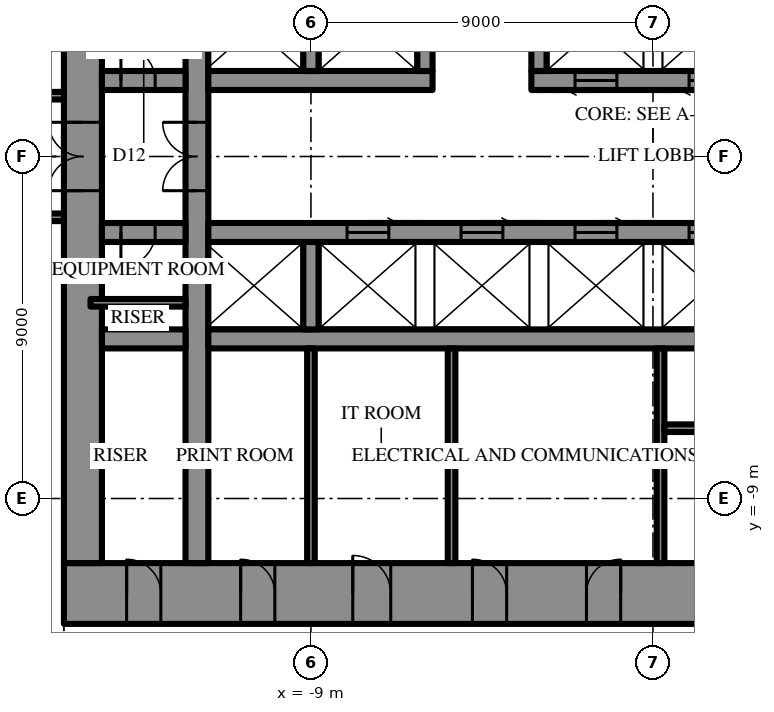
"""IFC4 building model, lengths in metres.
Left out: names, types, materials, properties, quantities, classifications, styles, units other than length and angle.
Written with IfcOpenShell. Run it as: python <this file> out.ifc"""

import sys

from ifc_helpers import new_model, si_unit, direction, frame, frame_2d, origin, place, context, subcontext, project, spatial, rectangle, extrude, element, fill, save


model = new_model("IFC4")
c1 = context("Model", 3, precision=1e-05, world=origin(), true_north=direction((0.0, 1.0)))
c2 = subcontext(c1, "Body", "Model", "MODEL_VIEW")
j1 = project(units=[si_unit("LENGTHUNIT", "METRE"), si_unit("PLANEANGLEUNIT", "RADIAN")], contexts=[c1])
p1 = place(None, origin())
s1 = spatial("IfcSite", under=j1, at=p1, CompositionType="ELEMENT")
p2 = place(p1, origin())
s2 = spatial("IfcBuilding", under=s1, at=p2, CompositionType="ELEMENT")
p3 = place(p2, frame((0.0, 0.0, 236.5)))
s3 = spatial("IfcBuildingStorey", under=s2, at=p3, CompositionType="ELEMENT", Elevation=236.5)
p4 = place(p3, frame((15.5, -11.5, 0.0), z_axis=(0.0, 0.0, 1.0), x_axis=(-1.0, 0.0, 0.0)))
e1 = element("IfcWall", 1, at=p4, inside=s3, PredefinedType="SHEAR", context=c2, shape_type="SweptSolid", body=[
    extrude(rectangle(XDim=31.0, YDim=1.6, at=frame_2d((15.5, 0.0))), origin(), (0.0, 0.0, 1.0), 4.2),
])
p5 = place(p4, frame((16.35, 0.0, 0.0)))
e2 = element("IfcOpeningElement", 2, at=p5, cuts=e1, PredefinedType="OPENING", context=c2, shape_type="SweptSolid", body=[
    extrude(rectangle(XDim=0.9, YDim=2.2, at=frame_2d((0.45, 1.1))), frame((0.0, 0.81, 0.0), z_axis=(0.0, -1.0, 0.0), x_axis=(1.0, 0.0, 0.0)), (0.0, 0.0, 1.0), 1.62),
])
p6 = place(p4, frame((19.35, 0.0, 0.0)))
e3 = element("IfcOpeningElement", 3, at=p6, cuts=e1, PredefinedType="OPENING", context=c2, shape_type="SweptSolid", body=[
    extrude(rectangle(XDim=0.9, YDim=2.2, at=frame_2d((0.45, 1.1))), frame((0.0, 0.81, 0.0), z_axis=(0.0, -1.0, 0.0), x_axis=(1.0, 0.0, 0.0)), (0.0, 0.0, 1.0), 1.62),
])
p7 = place(p4, frame((22.4, 0.0, 0.0)))
e4 = element("IfcOpeningElement", 4, at=p7, cuts=e1, PredefinedType="OPENING", context=c2, shape_type="SweptSolid", body=[
    extrude(rectangle(XDim=1.0, YDim=2.2, at=frame_2d((0.5, 1.1))), frame((0.0, 0.81, 0.0), z_axis=(0.0, -1.0, 0.0), x_axis=(1.0, 0.0, 0.0)), (0.0, 0.0, 1.0), 1.62),
])
p8 = place(p4, frame((1.65, 0.0, 0.0)))
e5 = element("IfcOpeningElement", 5, at=p8, cuts=e1, PredefinedType="OPENING", context=c2, shape_type="SweptSolid", body=[
    extrude(rectangle(XDim=0.9, YDim=2.2, at=frame_2d((0.45, 1.1))), frame((0.0, 0.81, 0.0), z_axis=(0.0, -1.0, 0.0), x_axis=(1.0, 0.0, 0.0)), (0.0, 0.0, 1.0), 1.62),
])
p9 = place(p4, frame((4.65, 0.0, 0.0)))
e6 = element("IfcOpeningElement", 6, at=p9, cuts=e1, PredefinedType="OPENING", context=c2, shape_type="SweptSolid", body=[
    extrude(rectangle(XDim=0.9, YDim=2.2, at=frame_2d((0.45, 1.1))), frame((0.0, 0.81, 0.0), z_axis=(0.0, -1.0, 0.0), x_axis=(1.0, 0.0, 0.0)), (0.0, 0.0, 1.0), 1.62),
])
p10 = place(p4, frame((25.45, 0.0, 0.0)))
e7 = element("IfcOpeningElement", 7, at=p10, cuts=e1, PredefinedType="OPENING", context=c2, shape_type="SweptSolid", body=[
    extrude(rectangle(XDim=0.9, YDim=2.2, at=frame_2d((0.45, 1.1))), frame((0.0, 0.81, 0.0), z_axis=(0.0, -1.0, 0.0), x_axis=(1.0, 0.0, 0.0)), (0.0, 0.0, 1.0), 1.62),
])
p11 = place(p4, frame((28.45, 0.0, 0.0)))
e8 = element("IfcOpeningElement", 8, at=p11, cuts=e1, PredefinedType="OPENING", context=c2, shape_type="SweptSolid", body=[
    extrude(rectangle(XDim=0.9, YDim=2.2, at=frame_2d((0.45, 1.1))), frame((0.0, 0.81, 0.0), z_axis=(0.0, -1.0, 0.0), x_axis=(1.0, 0.0, 0.0)), (0.0, 0.0, 1.0), 1.62),
])
p12 = place(p3, frame((-15.0, 10.7, 0.0), z_axis=(0.0, 0.0, 1.0), x_axis=(0.0, -1.0, 0.0)))
e9 = element("IfcWall", 9, at=p12, inside=s3, PredefinedType="SHEAR", context=c2, shape_type="SweptSolid", body=[
    extrude(rectangle(XDim=21.4, YDim=1.0, at=frame_2d((10.7, 0.0))), origin(), (0.0, 0.0, 1.0), 4.2),
])
p13 = place(p12, frame((9.8, 0.0, 0.0)))
e10 = element("IfcOpeningElement", 10, at=p13, cuts=e9, PredefinedType="OPENING", context=c2, shape_type="SweptSolid", body=[
    extrude(rectangle(XDim=1.8, YDim=2.4, at=frame_2d((0.9, 1.2))), frame((0.0, 0.51, 0.0), z_axis=(0.0, -1.0, 0.0), x_axis=(1.0, 0.0, 0.0)), (0.0, 0.0, 1.0), 1.02),
])
p14 = place(p3, frame((-12.0, -10.7, 0.0), z_axis=(0.0, 0.0, 1.0), x_axis=(0.0, 1.0, 0.0)))
e11 = element("IfcWall", 11, at=p14, inside=s3, PredefinedType="SHEAR", context=c2, shape_type="SweptSolid", body=[
    extrude(rectangle(XDim=21.4, YDim=0.6, at=frame_2d((10.7, 0.0))), origin(), (0.0, 0.0, 1.0), 4.2),
])
p15 = place(p14, frame((9.8, 0.0, 0.0)))
e12 = element("IfcOpeningElement", 12, at=p15, cuts=e11, PredefinedType="OPENING", context=c2, shape_type="SweptSolid", body=[
    extrude(rectangle(XDim=1.8, YDim=2.4, at=frame_2d((0.9, 1.2))), frame((0.0, 0.31, 0.0), z_axis=(0.0, -1.0, 0.0), x_axis=(1.0, 0.0, 0.0)), (0.0, 0.0, 1.0), 0.62),
])
p16 = place(p3, frame((-14.5, 2.0, 0.0), z_axis=(0.0, 0.0, 1.0), x_axis=(1.0, 0.0, 0.0)))
e13 = element("IfcWall", 13, at=p16, inside=s3, PredefinedType="SHEAR", context=c2, shape_type="SweptSolid", body=[
    extrude(rectangle(XDim=2.2, YDim=0.5, at=frame_2d((1.1, 0.0))), origin(), (0.0, 0.0, 1.0), 4.2),
])
p17 = place(p16, frame((0.5, 0.0, 0.0)))
e14 = element("IfcOpeningElement", 14, at=p17, cuts=e13, PredefinedType="OPENING", context=c2, shape_type="SweptSolid", body=[
    extrude(rectangle(XDim=0.9, YDim=2.2, at=frame_2d((0.45, 1.1))), frame((0.0, 0.26, 0.0), z_axis=(0.0, -1.0, 0.0), x_axis=(1.0, 0.0, 0.0)), (0.0, 0.0, 1.0), 0.52),
])
p18 = place(p3, frame((-11.7, 2.0, 0.0), z_axis=(0.0, 0.0, 1.0), x_axis=(1.0, 0.0, 0.0)))
e15 = element("IfcWall", 15, at=p18, inside=s3, PredefinedType="SHEAR", context=c2, shape_type="SweptSolid", body=[
    extrude(rectangle(XDim=5.9, YDim=0.5, at=frame_2d((2.95, 0.0))), origin(), (0.0, 0.0, 1.0), 4.2),
])
p19 = place(p3, frame((-3.2, 2.0, 0.0), z_axis=(0.0, 0.0, 1.0), x_axis=(1.0, 0.0, 0.0)))
e16 = element("IfcWall", 16, at=p19, inside=s3, PredefinedType="SHEAR", context=c2, shape_type="SweptSolid", body=[
    extrude(rectangle(XDim=14.9, YDim=0.5, at=frame_2d((7.45, 0.0))), origin(), (0.0, 0.0, 1.0), 4.2),
])
p20 = place(p19, frame((1.15, 0.0, 0.0)))
e17 = element("IfcOpeningElement", 17, at=p20, cuts=e16, PredefinedType="OPENING", context=c2, shape_type="SweptSolid", body=[
    extrude(rectangle(XDim=1.1, YDim=2.2, at=frame_2d((0.55, 1.1))), frame((0.0, 0.26, 0.0), z_axis=(0.0, -1.0, 0.0), x_axis=(1.0, 0.0, 0.0)), (0.0, 0.0, 1.0), 0.52),
])
p21 = place(p19, frame((4.15, 0.0, 0.0)))
e18 = element("IfcOpeningElement", 18, at=p21, cuts=e16, PredefinedType="OPENING", context=c2, shape_type="SweptSolid", body=[
    extrude(rectangle(XDim=1.1, YDim=2.2, at=frame_2d((0.55, 1.1))), frame((0.0, 0.26, 0.0), z_axis=(0.0, -1.0, 0.0), x_axis=(1.0, 0.0, 0.0)), (0.0, 0.0, 1.0), 0.52),
])
p22 = place(p19, frame((7.15, 0.0, 0.0)))
e19 = element("IfcOpeningElement", 19, at=p22, cuts=e16, PredefinedType="OPENING", context=c2, shape_type="SweptSolid", body=[
    extrude(rectangle(XDim=1.1, YDim=2.2, at=frame_2d((0.55, 1.1))), frame((0.0, 0.26, 0.0), z_axis=(0.0, -1.0, 0.0), x_axis=(1.0, 0.0, 0.0)), (0.0, 0.0, 1.0), 0.52),
])
p23 = place(p19, frame((10.15, 0.0, 0.0)))
e20 = element("IfcOpeningElement", 20, at=p23, cuts=e16, PredefinedType="OPENING", context=c2, shape_type="SweptSolid", body=[
    extrude(rectangle(XDim=1.1, YDim=2.2, at=frame_2d((0.55, 1.1))), frame((0.0, 0.26, 0.0), z_axis=(0.0, -1.0, 0.0), x_axis=(1.0, 0.0, 0.0)), (0.0, 0.0, 1.0), 0.52),
])
for number, where, z_axis, x_axis in (
    (21, (-9.0, 2.25, 0.0), (0.0, 0.0, 1.0), (0.0, 1.0, 0.0)),
    (22, (-6.0, 2.25, 0.0), (0.0, 0.0, 1.0), (0.0, 1.0, 0.0)),
    (23, (-3.0, 2.25, 0.0), (0.0, 0.0, 1.0), (0.0, 1.0, 0.0)),
):
    element("IfcWall", number, at=place(p3, frame(where, z_axis=z_axis, x_axis=x_axis)), inside=s3, PredefinedType="SHEAR", context=c2, shape_type="SweptSolid", body=[
        extrude(rectangle(XDim=2.3, YDim=0.4, at=frame_2d((1.15, 0.0))), origin(), (0.0, 0.0, 1.0), 4.2),
    ])
p24 = place(p3, frame((3.2, -2.0, 0.0), z_axis=(0.0, 0.0, 1.0), x_axis=(-1.0, 0.0, 0.0)))
e24 = element("IfcWall", 24, at=p24, inside=s3, PredefinedType="SHEAR", context=c2, shape_type="SweptSolid", body=[
    extrude(rectangle(XDim=14.9, YDim=0.5, at=frame_2d((7.45, 0.0))), origin(), (0.0, 0.0, 1.0), 4.2),
])
p25 = place(p24, frame((1.15, 0.0, 0.0)))
e25 = element("IfcOpeningElement", 25, at=p25, cuts=e24, PredefinedType="OPENING", context=c2, shape_type="SweptSolid", body=[
    extrude(rectangle(XDim=1.1, YDim=2.2, at=frame_2d((0.55, 1.1))), frame((0.0, 0.26, 0.0), z_axis=(0.0, -1.0, 0.0), x_axis=(1.0, 0.0, 0.0)), (0.0, 0.0, 1.0), 0.52),
])
p26 = place(p24, frame((4.15, 0.0, 0.0)))
e26 = element("IfcOpeningElement", 26, at=p26, cuts=e24, PredefinedType="OPENING", context=c2, shape_type="SweptSolid", body=[
    extrude(rectangle(XDim=1.1, YDim=2.2, at=frame_2d((0.55, 1.1))), frame((0.0, 0.26, 0.0), z_axis=(0.0, -1.0, 0.0), x_axis=(1.0, 0.0, 0.0)), (0.0, 0.0, 1.0), 0.52),
])
p27 = place(p24, frame((7.15, 0.0, 0.0)))
e27 = element("IfcOpeningElement", 27, at=p27, cuts=e24, PredefinedType="OPENING", context=c2, shape_type="SweptSolid", body=[
    extrude(rectangle(XDim=1.1, YDim=2.2, at=frame_2d((0.55, 1.1))), frame((0.0, 0.26, 0.0), z_axis=(0.0, -1.0, 0.0), x_axis=(1.0, 0.0, 0.0)), (0.0, 0.0, 1.0), 0.52),
])
p28 = place(p24, frame((10.15, 0.0, 0.0)))
e28 = element("IfcOpeningElement", 28, at=p28, cuts=e24, PredefinedType="OPENING", context=c2, shape_type="SweptSolid", body=[
    extrude(rectangle(XDim=1.1, YDim=2.2, at=frame_2d((0.55, 1.1))), frame((0.0, 0.26, 0.0), z_axis=(0.0, -1.0, 0.0), x_axis=(1.0, 0.0, 0.0)), (0.0, 0.0, 1.0), 0.52),
])
p29 = place(p3, frame((-12.3, -2.0, 0.0), z_axis=(0.0, 0.0, 1.0), x_axis=(-1.0, 0.0, 0.0)))
e29 = element("IfcWall", 29, at=p29, inside=s3, PredefinedType="SHEAR", context=c2, shape_type="SweptSolid", body=[
    extrude(rectangle(XDim=2.2, YDim=0.5, at=frame_2d((1.1, 0.0))), origin(), (0.0, 0.0, 1.0), 4.2),
])
p30 = place(p29, frame((0.8, 0.0, 0.0)))
e30 = element("IfcOpeningElement", 30, at=p30, cuts=e29, PredefinedType="OPENING", context=c2, shape_type="SweptSolid", body=[
    extrude(rectangle(XDim=0.9, YDim=2.2, at=frame_2d((0.45, 1.1))), frame((0.0, 0.26, 0.0), z_axis=(0.0, -1.0, 0.0), x_axis=(1.0, 0.0, 0.0)), (0.0, 0.0, 1.0), 0.52),
])
p31 = place(p3, frame((11.7, -4.8, 0.0), z_axis=(0.0, 0.0, 1.0), x_axis=(-1.0, 0.0, 0.0)))
e31 = element("IfcWall", 31, at=p31, inside=s3, PredefinedType="SHEAR", context=c2, shape_type="SweptSolid", body=[
    extrude(rectangle(XDim=23.4, YDim=0.5, at=frame_2d((11.7, 0.0))), origin(), (0.0, 0.0, 1.0), 4.2),
])
p32 = place(p31, frame((6.6, 0.0, 0.0)))
e32 = element("IfcOpeningElement", 32, at=p32, cuts=e31, PredefinedType="OPENING", context=c2, shape_type="SweptSolid", body=[
    extrude(rectangle(XDim=1.2, YDim=2.2, at=frame_2d((0.6, 1.1))), frame((0.0, 0.26, 0.0), z_axis=(0.0, -1.0, 0.0), x_axis=(1.0, 0.0, 0.0)), (0.0, 0.0, 1.0), 0.52),
])
p33 = place(p31, frame((3.6, 0.0, 0.0)))
e33 = element("IfcOpeningElement", 33, at=p33, cuts=e31, PredefinedType="OPENING", context=c2, shape_type="SweptSolid", body=[
    extrude(rectangle(XDim=1.2, YDim=2.2, at=frame_2d((0.6, 1.1))), frame((0.0, 0.26, 0.0), z_axis=(0.0, -1.0, 0.0), x_axis=(1.0, 0.0, 0.0)), (0.0, 0.0, 1.0), 0.52),
])
p34 = place(p3, frame((-12.3, -4.8, 0.0), z_axis=(0.0, 0.0, 1.0), x_axis=(-1.0, 0.0, 0.0)))
e34 = element("IfcWall", 34, at=p34, inside=s3, PredefinedType="SHEAR", context=c2, shape_type="SweptSolid", body=[
    extrude(rectangle(XDim=2.2, YDim=0.5, at=frame_2d((1.1, 0.0))), origin(), (0.0, 0.0, 1.0), 4.2),
])
p35 = place(p3, frame((-9.0, -2.25, 0.0), z_axis=(0.0, 0.0, 1.0), x_axis=(0.0, -1.0, 0.0)))
e35 = element("IfcWall", 35, at=p35, inside=s3, PredefinedType="SHEAR", context=c2, shape_type="SweptSolid", body=[
    extrude(rectangle(XDim=2.3, YDim=0.4, at=frame_2d((1.15, 0.0))), origin(), (0.0, 0.0, 1.0), 4.2),
])
p36 = place(p3, frame((0.2, -5.05, 0.0), z_axis=(0.0, 0.0, 1.0), x_axis=(0.0, -1.0, 0.0)))
e36 = element("IfcWall", 36, at=p36, inside=s3, PredefinedType="SHEAR", context=c2, shape_type="SweptSolid", body=[
    extrude(rectangle(XDim=5.65, YDim=0.2, at=frame_2d((2.825, 0.0))), origin(), (0.0, 0.0, 1.0), 4.2),
])
p37 = place(p3, frame((8.9, -7.15, 0.0), z_axis=(0.0, 0.0, 1.0), x_axis=(-1.0, 0.0, 0.0)))
e37 = element("IfcWall", 37, at=p37, inside=s3, PredefinedType="SHEAR", context=c2, shape_type="SweptSolid", body=[
    extrude(rectangle(XDim=8.6, YDim=0.2, at=frame_2d((4.3, 0.0))), origin(), (0.0, 0.0, 1.0), 4.2),
])
p38 = place(p37, frame((0.3, 0.0, 0.0)))
e38 = element("IfcOpeningElement", 38, at=p38, cuts=e37, PredefinedType="OPENING", context=c2, shape_type="SweptSolid", body=[
    extrude(rectangle(XDim=1.0, YDim=2.2, at=frame_2d((0.5, 1.1))), frame((0.0, 0.11, 0.0), z_axis=(0.0, -1.0, 0.0), x_axis=(1.0, 0.0, 0.0)), (0.0, 0.0, 1.0), 0.22),
])
for number, where, z_axis, x_axis in (
    (39, (-9.0, -5.05, 0.0), (0.0, 0.0, 1.0), (0.0, -1.0, 0.0)),
    (40, (-5.3, -5.05, 0.0), (0.0, 0.0, 1.0), (0.0, -1.0, 0.0)),
):
    element("IfcWall", number, at=place(p3, frame(where, z_axis=z_axis, x_axis=x_axis)), inside=s3, PredefinedType="PARTITIONING", context=c2, shape_type="SweptSolid", body=[
        extrude(rectangle(XDim=5.65, YDim=0.2, at=frame_2d((2.825, 0.0))), origin(), (0.0, 0.0, 1.0), 4.0),
    ])
p39 = place(p3, frame((-12.3, -3.85, 0.0), z_axis=(0.0, 0.0, 1.0), x_axis=(-1.0, 0.0, 0.0)))
e41 = element("IfcWall", 41, at=p39, inside=s3, PredefinedType="PARTITIONING", context=c2, shape_type="SweptSolid", body=[
    extrude(rectangle(XDim=2.5, YDim=0.2, at=frame_2d((1.25, 0.0))), origin(), (0.0, 0.0, 1.0), 4.0),
])
p40 = place(p3, frame((-15.5, 1.6, 0.0), z_axis=(0.0, 0.0, 1.0), x_axis=(-1.0, 0.0, 0.0)))
e42 = element("IfcWall", 42, at=p40, inside=s3, PredefinedType="PARTITIONING", context=c2, shape_type="SweptSolid", body=[
    extrude(rectangle(XDim=9.7, YDim=0.2, at=frame_2d((4.85, 0.0))), origin(), (0.0, 0.0, 1.0), 4.0),
])
p41 = place(p40, frame((6.29, 0.0, 0.0)))
e43 = element("IfcOpeningElement", 43, at=p41, cuts=e42, PredefinedType="OPENING", context=c2, shape_type="SweptSolid", body=[
    extrude(rectangle(XDim=1.0, YDim=2.2, at=frame_2d((0.5, 1.1))), frame((0.0, 0.11, 0.0), z_axis=(0.0, -1.0, 0.0), x_axis=(1.0, 0.0, 0.0)), (0.0, 0.0, 1.0), 0.22),
])
p42 = place(p3, frame((-15.5, -1.6, 0.0), z_axis=(0.0, 0.0, 1.0), x_axis=(-1.0, 0.0, 0.0)))
e44 = element("IfcWall", 44, at=p42, inside=s3, PredefinedType="PARTITIONING", context=c2, shape_type="SweptSolid", body=[
    extrude(rectangle(XDim=2.3, YDim=0.2, at=frame_2d((1.15, 0.0))), origin(), (0.0, 0.0, 1.0), 4.0),
])
p43 = place(p13, frame((1.8, 0.0, 0.0), z_axis=(0.0, 0.0, 1.0), x_axis=(-1.0, 0.0, 0.0)))
e45 = element("IfcDoor", 45, at=p43, inside=s3, OperationType="DOUBLE_DOOR_SINGLE_SWING", PredefinedType="DOOR", context=c2, shape_type="SweptSolid", body=[
    extrude(rectangle(XDim=1.8, YDim=2.4, at=frame_2d((0.9, 1.2))), frame((0.0, 0.025, 0.0), z_axis=(0.0, -1.0, 0.0), x_axis=(1.0, 0.0, 0.0)), (0.0, 0.0, 1.0), 0.05),
])
fill(e10, e45)
p44 = place(p5, frame((0.9, 0.0, 0.0), z_axis=(0.0, 0.0, 1.0), x_axis=(-1.0, 0.0, 0.0)))
e46 = element("IfcDoor", 46, at=p44, inside=s3, OperationType="SINGLE_SWING_LEFT", PredefinedType="DOOR", context=c2, shape_type="SweptSolid", body=[
    extrude(rectangle(XDim=0.9, YDim=2.2, at=frame_2d((0.45, 1.1))), frame((0.0, 0.025, 0.0), z_axis=(0.0, -1.0, 0.0), x_axis=(1.0, 0.0, 0.0)), (0.0, 0.0, 1.0), 0.05),
])
fill(e2, e46)
p45 = place(p6, frame((0.9, 0.0, 0.0), z_axis=(0.0, 0.0, 1.0), x_axis=(-1.0, 0.0, 0.0)))
e47 = element("IfcDoor", 47, at=p45, inside=s3, OperationType="SINGLE_SWING_RIGHT", PredefinedType="DOOR", context=c2, shape_type="SweptSolid", body=[
    extrude(rectangle(XDim=0.9, YDim=2.2, at=frame_2d((0.45, 1.1))), frame((0.0, 0.025, 0.0), z_axis=(0.0, -1.0, 0.0), x_axis=(1.0, 0.0, 0.0)), (0.0, 0.0, 1.0), 0.05),
])
fill(e3, e47)
p46 = place(p7, frame((1.0, 0.0, 0.0), z_axis=(0.0, 0.0, 1.0), x_axis=(-1.0, 0.0, 0.0)))
e48 = element("IfcDoor", 48, at=p46, inside=s3, OperationType="SINGLE_SWING_RIGHT", PredefinedType="DOOR", context=c2, shape_type="SweptSolid", body=[
    extrude(rectangle(XDim=1.0, YDim=2.2, at=frame_2d((0.5, 1.1))), frame((0.0, 0.025, 0.0), z_axis=(0.0, -1.0, 0.0), x_axis=(1.0, 0.0, 0.0)), (0.0, 0.0, 1.0), 0.05),
])
fill(e4, e48)
p47 = place(p10, frame((0.9, 0.0, 0.0), z_axis=(0.0, 0.0, 1.0), x_axis=(-1.0, 0.0, 0.0)))
e49 = element("IfcDoor", 49, at=p47, inside=s3, OperationType="SINGLE_SWING_RIGHT", PredefinedType="DOOR", context=c2, shape_type="SweptSolid", body=[
    extrude(rectangle(XDim=0.9, YDim=2.2, at=frame_2d((0.45, 1.1))), frame((0.0, 0.025, 0.0), z_axis=(0.0, -1.0, 0.0), x_axis=(1.0, 0.0, 0.0)), (0.0, 0.0, 1.0), 0.05),
])
fill(e7, e49)
p48 = place(p11, frame((0.9, 0.0, 0.0), z_axis=(0.0, 0.0, 1.0), x_axis=(-1.0, 0.0, 0.0)))
e50 = element("IfcDoor", 50, at=p48, inside=s3, OperationType="SINGLE_SWING_RIGHT", PredefinedType="DOOR", context=c2, shape_type="SweptSolid", body=[
    extrude(rectangle(XDim=0.9, YDim=2.2, at=frame_2d((0.45, 1.1))), frame((0.0, 0.025, 0.0), z_axis=(0.0, -1.0, 0.0), x_axis=(1.0, 0.0, 0.0)), (0.0, 0.0, 1.0), 0.05),
])
fill(e8, e50)
p49 = place(p17, origin())
e51 = element("IfcDoor", 51, at=p49, inside=s3, OperationType="SINGLE_SWING_RIGHT", PredefinedType="DOOR", context=c2, shape_type="SweptSolid", body=[
    extrude(rectangle(XDim=0.9, YDim=2.2, at=frame_2d((0.45, 1.1))), frame((0.0, 0.025, 0.0), z_axis=(0.0, -1.0, 0.0), x_axis=(1.0, 0.0, 0.0)), (0.0, 0.0, 1.0), 0.05),
])
fill(e14, e51)
p50 = place(p30, origin())
e52 = element("IfcDoor", 52, at=p50, inside=s3, OperationType="SINGLE_SWING_LEFT", PredefinedType="DOOR", context=c2, shape_type="SweptSolid", body=[
    extrude(rectangle(XDim=0.9, YDim=2.2, at=frame_2d((0.45, 1.1))), frame((0.0, 0.025, 0.0), z_axis=(0.0, -1.0, 0.0), x_axis=(1.0, 0.0, 0.0)), (0.0, 0.0, 1.0), 0.05),
])
fill(e30, e52)
p51 = place(p15, origin())
e53 = element("IfcDoor", 53, at=p51, inside=s3, OperationType="DOUBLE_DOOR_SINGLE_SWING", PredefinedType="DOOR", context=c2, shape_type="SweptSolid", body=[
    extrude(rectangle(XDim=1.8, YDim=2.4, at=frame_2d((0.9, 1.2))), frame((0.0, 0.025, 0.0), z_axis=(0.0, -1.0, 0.0), x_axis=(1.0, 0.0, 0.0)), (0.0, 0.0, 1.0), 0.05),
])
fill(e12, e53)
p52 = place(p20, frame((1.1, 0.0, 0.0), z_axis=(0.0, 0.0, 1.0), x_axis=(-1.0, 0.0, 0.0)))
e54 = element("IfcDoor", 54, at=p52, inside=s3, OperationType="SLIDING_TO_LEFT", PredefinedType="DOOR", context=c2, shape_type="SweptSolid", body=[
    extrude(rectangle(XDim=1.1, YDim=2.2, at=frame_2d((0.55, 1.1))), frame((0.0, 0.025, 0.0), z_axis=(0.0, -1.0, 0.0), x_axis=(1.0, 0.0, 0.0)), (0.0, 0.0, 1.0), 0.05),
])
fill(e17, e54)
p53 = place(p21, frame((1.1, 0.0, 0.0), z_axis=(0.0, 0.0, 1.0), x_axis=(-1.0, 0.0, 0.0)))
e55 = element("IfcDoor", 55, at=p53, inside=s3, OperationType="SLIDING_TO_LEFT", PredefinedType="DOOR", context=c2, shape_type="SweptSolid", body=[
    extrude(rectangle(XDim=1.1, YDim=2.2, at=frame_2d((0.55, 1.1))), frame((0.0, 0.025, 0.0), z_axis=(0.0, -1.0, 0.0), x_axis=(1.0, 0.0, 0.0)), (0.0, 0.0, 1.0), 0.05),
])
fill(e18, e55)
p54 = place(p25, frame((1.1, 0.0, 0.0), z_axis=(0.0, 0.0, 1.0), x_axis=(-1.0, 0.0, 0.0)))
e56 = element("IfcDoor", 56, at=p54, inside=s3, OperationType="SLIDING_TO_LEFT", PredefinedType="DOOR", context=c2, shape_type="SweptSolid", body=[
    extrude(rectangle(XDim=1.1, YDim=2.2, at=frame_2d((0.55, 1.1))), frame((0.0, 0.025, 0.0), z_axis=(0.0, -1.0, 0.0), x_axis=(1.0, 0.0, 0.0)), (0.0, 0.0, 1.0), 0.05),
])
fill(e25, e56)
p55 = place(p26, frame((1.1, 0.0, 0.0), z_axis=(0.0, 0.0, 1.0), x_axis=(-1.0, 0.0, 0.0)))
e57 = element("IfcDoor", 57, at=p55, inside=s3, OperationType="SLIDING_TO_LEFT", PredefinedType="DOOR", context=c2, shape_type="SweptSolid", body=[
    extrude(rectangle(XDim=1.1, YDim=2.2, at=frame_2d((0.55, 1.1))), frame((0.0, 0.025, 0.0), z_axis=(0.0, -1.0, 0.0), x_axis=(1.0, 0.0, 0.0)), (0.0, 0.0, 1.0), 0.05),
])
fill(e26, e57)
p56 = place(p27, frame((1.1, 0.0, 0.0), z_axis=(0.0, 0.0, 1.0), x_axis=(-1.0, 0.0, 0.0)))
e58 = element("IfcDoor", 58, at=p56, inside=s3, OperationType="SLIDING_TO_LEFT", PredefinedType="DOOR", context=c2, shape_type="SweptSolid", body=[
    extrude(rectangle(XDim=1.1, YDim=2.2, at=frame_2d((0.55, 1.1))), frame((0.0, 0.025, 0.0), z_axis=(0.0, -1.0, 0.0), x_axis=(1.0, 0.0, 0.0)), (0.0, 0.0, 1.0), 0.05),
])
fill(e27, e58)
p57 = place(p28, frame((1.1, 0.0, 0.0), z_axis=(0.0, 0.0, 1.0), x_axis=(-1.0, 0.0, 0.0)))
e59 = element("IfcDoor", 59, at=p57, inside=s3, OperationType="SLIDING_TO_LEFT", PredefinedType="DOOR", context=c2, shape_type="SweptSolid", body=[
    extrude(rectangle(XDim=1.1, YDim=2.2, at=frame_2d((0.55, 1.1))), frame((0.0, 0.025, 0.0), z_axis=(0.0, -1.0, 0.0), x_axis=(1.0, 0.0, 0.0)), (0.0, 0.0, 1.0), 0.05),
])
fill(e28, e59)
save(model, sys.argv[1])
